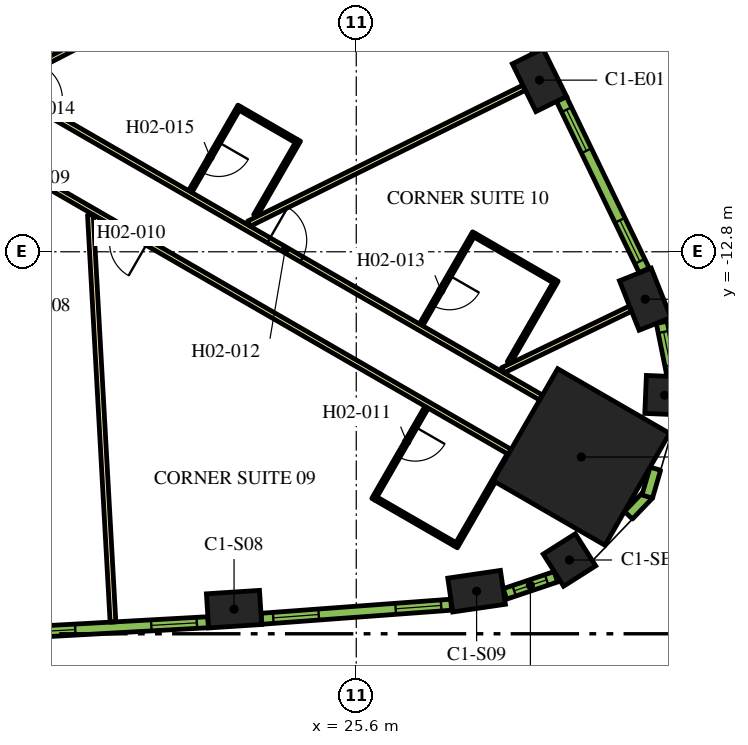
"""IFC4 building model, lengths in metres.
Left out: names, types, materials, properties, quantities, classifications, styles, units other than length and angle.
Written with IfcOpenShell. Run it as: python <this file> out.ifc"""

import sys

from ifc_helpers import new_model, si_unit, direction, frame, frame_2d, origin, origin_2d, place, context, subcontext, project, spatial, rectangle, extrude, element, fill, save


model = new_model("IFC4")
c1 = context("Model", 3, precision=1e-05, world=origin(), true_north=direction((0.0, 1.0)))
c2 = subcontext(c1, "Body", "Model", "MODEL_VIEW")
j1 = project(units=[si_unit("LENGTHUNIT", "METRE"), si_unit("PLANEANGLEUNIT", "RADIAN")], contexts=[c1])
p1 = place(None, origin())
s1 = spatial("IfcSite", under=j1, at=p1, CompositionType="ELEMENT")
p2 = place(p1, origin())
s2 = spatial("IfcBuilding", under=s1, at=p2, CompositionType="ELEMENT")
p3 = place(p2, frame((0.0, 0.0, 39.3)))
s3 = spatial("IfcBuildingStorey", under=s2, at=p3, CompositionType="ELEMENT", Elevation=39.3)
p4 = place(p3, frame((31.522, -18.199, 0.0), z_axis=(0.0, 0.0, 1.0), x_axis=(0.866025403784, -0.5, 0.0)))
e1 = element("IfcColumn", 1, at=p4, inside=s3, PredefinedType="COLUMN", context=c2, shape_type="SweptSolid", body=[
    extrude(rectangle(XDim=3.4, YDim=3.4, at=origin_2d()), origin(), (0.0, 0.0, 1.0), 3.9),
])
for number, where, z_axis, x_axis in (
    (2, (22.385, -22.204, 0.0), (0.0, 0.0, 1.0), (0.998, 0.065, 0.0)),
    (3, (28.767, -21.731, 0.0), (0.0, 0.0, 1.0), (0.989, 0.145, 0.0)),
):
    element("IfcColumn", number, at=place(p3, frame(where, z_axis=z_axis, x_axis=x_axis)), inside=s3, PredefinedType="COLUMN", context=c2, shape_type="SweptSolid", body=[
        extrude(rectangle(XDim=1.4, YDim=0.9, at=origin_2d()), origin(), (0.0, 0.0, 1.0), 3.9),
    ])
for number, where, z_axis, x_axis in (
    (4, (31.21, -20.91, 0.0), (0.0, 0.0, 1.0), (0.844, 0.536, 0.0)),
    (5, (33.713, -16.574, 0.0), (0.0, 0.0, 1.0), (0.042, 0.999, 0.0)),
):
    element("IfcColumn", number, at=place(p3, frame(where, z_axis=z_axis, x_axis=x_axis)), inside=s3, PredefinedType="COLUMN", context=c2, shape_type="SweptSolid", body=[
        extrude(rectangle(XDim=1.0, YDim=1.0, at=origin_2d()), origin(), (0.0, 0.0, 1.0), 3.9),
    ])
for number, where, z_axis, x_axis in (
    (6, (33.203, -14.047, 0.0), (0.0, 0.0, 1.0), (-0.369, 0.929, 0.0)),
    (7, (30.421, -8.284, 0.0), (0.0, 0.0, 1.0), (-0.443, 0.897, 0.0)),
):
    element("IfcColumn", number, at=place(p3, frame(where, z_axis=z_axis, x_axis=x_axis)), inside=s3, PredefinedType="COLUMN", context=c2, shape_type="SweptSolid", body=[
        extrude(rectangle(XDim=1.4, YDim=0.9, at=origin_2d()), origin(), (0.0, 0.0, 1.0), 3.9),
    ])
p5 = place(p3, frame((16.412, -8.523, 0.0), z_axis=(0.0, 0.0, 1.0), x_axis=(0.866022197818, -0.500005552856, 0.0)))
e8 = element("IfcWall", 8, at=p5, inside=s3, PredefinedType="PARTITIONING", context=c2, shape_type="SweptSolid", body=[
    extrude(rectangle(XDim=16.224, YDim=0.15, at=frame_2d((8.112, 0.0))), origin(), (0.0, 0.0, 1.0), 2.75),
])
p6 = place(p5, frame((7.949, 0.0, 0.0)))
e9 = element("IfcOpeningElement", 9, at=p6, cuts=e8, PredefinedType="OPENING", context=c2, shape_type="SweptSolid", body=[
    extrude(rectangle(XDim=1.0, YDim=2.1, at=frame_2d((0.5, 1.05))), frame((0.0, 0.085, 0.0), z_axis=(0.0, -1.0, 0.0), x_axis=(1.0, 0.0, 0.0)), (0.0, 0.0, 1.0), 0.17),
])
p7 = place(p5, frame((0.526, 0.0, 0.0)))
e10 = element("IfcOpeningElement", 10, at=p7, cuts=e8, PredefinedType="OPENING", context=c2, shape_type="SweptSolid", body=[
    extrude(rectangle(XDim=1.0, YDim=2.1, at=frame_2d((0.5, 1.05))), frame((0.0, 0.085, 0.0), z_axis=(0.0, -1.0, 0.0), x_axis=(1.0, 0.0, 0.0)), (0.0, 0.0, 1.0), 0.17),
])
p8 = place(p3, frame((19.081, -3.9, 0.0), z_axis=(0.0, 0.0, 1.0), x_axis=(-0.499974327079, -0.866040225545, 0.0)))
e11 = element("IfcWall", 11, at=p8, inside=s3, PredefinedType="PARTITIONING", context=c2, shape_type="SweptSolid", body=[
    extrude(rectangle(XDim=5.258, YDim=0.15, at=frame_2d((2.629, 0.0))), origin(), (0.0, 0.0, 1.0), 2.75),
])
p9 = place(p3, frame((29.638, -18.064, 0.0), z_axis=(0.0, 0.0, 1.0), x_axis=(-0.866026175601, 0.499998663172, 0.0)))
e12 = element("IfcWall", 12, at=p9, inside=s3, PredefinedType="PARTITIONING", context=c2, shape_type="SweptSolid", body=[
    extrude(rectangle(XDim=16.144, YDim=0.15, at=frame_2d((8.072, 0.0))), origin(), (0.0, 0.0, 1.0), 2.75),
])
p10 = place(p9, frame((13.948, 0.0, 0.0)))
e13 = element("IfcOpeningElement", 13, at=p10, cuts=e12, PredefinedType="OPENING", context=c2, shape_type="SweptSolid", body=[
    extrude(rectangle(XDim=0.9, YDim=2.1, at=frame_2d((0.45, 1.05))), frame((0.0, 0.085, 0.0), z_axis=(0.0, -1.0, 0.0), x_axis=(1.0, 0.0, 0.0)), (0.0, 0.0, 1.0), 0.17),
])
p11 = place(p9, frame((11.004, 0.0, 0.0)))
e14 = element("IfcOpeningElement", 14, at=p11, cuts=e12, PredefinedType="OPENING", context=c2, shape_type="SweptSolid", body=[
    extrude(rectangle(XDim=1.0, YDim=2.1, at=frame_2d((0.5, 1.05))), frame((0.0, 0.085, 0.0), z_axis=(0.0, -1.0, 0.0), x_axis=(1.0, 0.0, 0.0)), (0.0, 0.0, 1.0), 0.17),
])
p12 = place(p3, frame((27.134, -2.779, 0.0), z_axis=(0.0, 0.0, 1.0), x_axis=(-0.8882049501, -0.459447457951, 0.0)))
e15 = element("IfcWall", 15, at=p12, inside=s3, PredefinedType="PARTITIONING", context=c2, shape_type="SweptSolid", body=[
    extrude(rectangle(XDim=11.638, YDim=0.15, at=frame_2d((5.819, 0.0))), origin(), (0.0, 0.0, 1.0), 2.75),
])
p13 = place(p3, frame((19.198, -22.541, 0.0), z_axis=(0.0, 0.0, 1.0), x_axis=(-0.055432210572, 0.99846245299, 0.0)))
e16 = element("IfcWall", 16, at=p13, inside=s3, PredefinedType="PARTITIONING", context=c2, shape_type="SweptSolid", body=[
    extrude(rectangle(XDim=10.729, YDim=0.15, at=frame_2d((5.365, 0.0))), origin(), (0.0, 0.0, 1.0), 2.75),
])
p14 = place(p3, frame((30.018, -8.483, 0.0), z_axis=(0.0, 0.0, 1.0), x_axis=(-0.896544505264, -0.44295366584, 0.0)))
e17 = element("IfcWall", 17, at=p14, inside=s3, PredefinedType="PARTITIONING", context=c2, shape_type="SweptSolid", body=[
    extrude(rectangle(XDim=8.079, YDim=0.15, at=frame_2d((4.04, 0.0))), origin(), (0.0, 0.0, 1.0), 2.75),
])
p15 = place(p3, frame((32.817, -14.296, 0.0), z_axis=(0.0, 0.0, 1.0), x_axis=(-0.900616957918, -0.434613730927, 0.0)))
e18 = element("IfcWall", 18, at=p15, inside=s3, PredefinedType="PARTITIONING", context=c2, shape_type="SweptSolid", body=[
    extrude(rectangle(XDim=3.733, YDim=0.15, at=frame_2d((1.867, 0.0))), origin(), (0.0, 0.0, 1.0), 2.75),
])
p16 = place(p3, frame((27.452, -16.889, 0.0), z_axis=(0.0, 0.0, 1.0), x_axis=(-0.49998411664, -0.866034573852, 0.0)))
e19 = element("IfcWall", 19, at=p16, inside=s3, PredefinedType="PARTITIONING", context=c2, shape_type="SweptSolid", body=[
    extrude(rectangle(XDim=2.8, YDim=0.1, at=frame_2d((1.4, 0.0))), origin(), (0.0, 0.0, 1.0), 2.75),
])
p17 = place(p16, frame((0.6, 0.0, 0.0)))
e20 = element("IfcOpeningElement", 20, at=p17, cuts=e19, PredefinedType="OPENING", context=c2, shape_type="SweptSolid", body=[
    extrude(rectangle(XDim=0.9, YDim=2.1, at=frame_2d((0.45, 1.05))), frame((0.0, 0.06, 0.0), z_axis=(0.0, -1.0, 0.0), x_axis=(1.0, 0.0, 0.0)), (0.0, 0.0, 1.0), 0.12),
])
p18 = place(p3, frame((26.121, -19.295, 0.0), z_axis=(0.0, 0.0, 1.0), x_axis=(0.866006032174, -0.500033551112, 0.0)))
e21 = element("IfcWall", 21, at=p18, inside=s3, PredefinedType="PARTITIONING", context=c2, shape_type="SweptSolid", body=[
    extrude(rectangle(XDim=2.4, YDim=0.1, at=frame_2d((1.2, 0.0))), origin(), (0.0, 0.0, 1.0), 2.75),
])
p19 = place(p3, frame((29.617, -18.139, 0.0), z_axis=(0.0, 0.0, 1.0), x_axis=(-0.49998411664, -0.866034573852, 0.0)))
e22 = element("IfcWall", 22, at=p19, inside=s3, PredefinedType="PARTITIONING", context=c2, shape_type="SweptSolid", body=[
    extrude(rectangle(XDim=2.8, YDim=0.1, at=frame_2d((1.4, 0.0))), origin(), (0.0, 0.0, 1.0), 2.75),
])
p20 = place(p3, frame((28.704, -12.3, 0.0), z_axis=(0.0, 0.0, 1.0), x_axis=(-0.49998411664, -0.866034573852, 0.0)))
e23 = element("IfcWall", 23, at=p20, inside=s3, PredefinedType="PARTITIONING", context=c2, shape_type="SweptSolid", body=[
    extrude(rectangle(XDim=2.8, YDim=0.1, at=frame_2d((1.4, 0.0))), origin(), (0.0, 0.0, 1.0), 2.75),
])
p21 = place(p20, frame((1.3, 0.0, 0.0)))
e24 = element("IfcOpeningElement", 24, at=p21, cuts=e23, PredefinedType="OPENING", context=c2, shape_type="SweptSolid", body=[
    extrude(rectangle(XDim=0.9, YDim=2.1, at=frame_2d((0.45, 1.05))), frame((0.0, 0.06, 0.0), z_axis=(0.0, -1.0, 0.0), x_axis=(1.0, 0.0, 0.0)), (0.0, 0.0, 1.0), 0.12),
])
p22 = place(p3, frame((28.722, -12.368, 0.0), z_axis=(0.0, 0.0, 1.0), x_axis=(0.866050077142, -0.499957262057, 0.0)))
e25 = element("IfcWall", 25, at=p22, inside=s3, PredefinedType="PARTITIONING", context=c2, shape_type="SweptSolid", body=[
    extrude(rectangle(XDim=2.4, YDim=0.1, at=frame_2d((1.2, 0.0))), origin(), (0.0, 0.0, 1.0), 2.75),
])
p23 = place(p3, frame((29.619, -15.715, 0.0), z_axis=(0.0, 0.0, 1.0), x_axis=(0.500004234368, 0.866022959057, 0.0)))
e26 = element("IfcWall", 26, at=p23, inside=s3, PredefinedType="PARTITIONING", context=c2, shape_type="SweptSolid", body=[
    extrude(rectangle(XDim=2.5, YDim=0.1, at=frame_2d((1.25, 0.0))), origin(), (0.0, 0.0, 1.0), 2.75),
])
p24 = place(p3, frame((22.53, -8.966, 0.0), z_axis=(0.0, 0.0, 1.0), x_axis=(-0.500006934395, -0.866021400173, 0.0)))
e27 = element("IfcWall", 27, at=p24, inside=s3, PredefinedType="PARTITIONING", context=c2, shape_type="SweptSolid", body=[
    extrude(rectangle(XDim=2.6, YDim=0.1, at=frame_2d((1.3, 0.0))), origin(), (0.0, 0.0, 1.0), 2.75),
])
p25 = place(p24, frame((1.1, 0.0, 0.0)))
e28 = element("IfcOpeningElement", 28, at=p25, cuts=e27, PredefinedType="OPENING", context=c2, shape_type="SweptSolid", body=[
    extrude(rectangle(XDim=0.9, YDim=2.1, at=frame_2d((0.45, 1.05))), frame((0.0, 0.06, 0.0), z_axis=(0.0, -1.0, 0.0), x_axis=(1.0, 0.0, 0.0)), (0.0, 0.0, 1.0), 0.12),
])
p26 = place(p3, frame((22.549, -9.035, 0.0), z_axis=(0.0, 0.0, 1.0), x_axis=(0.86605165483, -0.499954529098, 0.0)))
e29 = element("IfcWall", 29, at=p26, inside=s3, PredefinedType="PARTITIONING", context=c2, shape_type="SweptSolid", body=[
    extrude(rectangle(XDim=1.7, YDim=0.1, at=frame_2d((0.85, 0.0))), origin(), (0.0, 0.0, 1.0), 2.75),
])
p27 = place(p3, frame((22.944, -11.85, 0.0), z_axis=(0.0, 0.0, 1.0), x_axis=(0.499968531483, 0.866043571379, 0.0)))
e30 = element("IfcWall", 30, at=p27, inside=s3, PredefinedType="PARTITIONING", context=c2, shape_type="SweptSolid", body=[
    extrude(rectangle(XDim=2.29, YDim=0.1, at=frame_2d((1.145, 0.0))), origin(), (0.0, 0.0, 1.0), 2.75),
])
p28 = place(p3, frame((16.711, -22.824, 0.0), z_axis=(0.0, 0.0, 1.0), x_axis=(0.998464708705, 0.055391564976, 0.0)))
e31 = element("IfcWall", 31, at=p28, inside=s3, PredefinedType="SOLIDWALL", context=c2, shape_type="SweptSolid", body=[
    extrude(rectangle(XDim=4.998, YDim=0.29, at=frame_2d((2.499, 0.0))), origin(), (0.0, 0.0, 1.0), 3.65),
])
p29 = place(p28, frame((0.297, 0.0, 0.9)))
e32 = element("IfcOpeningElement", 32, at=p29, cuts=e31, PredefinedType="OPENING", context=c2, shape_type="SweptSolid", body=[
    extrude(rectangle(XDim=1.2, YDim=2.15, at=frame_2d((0.6, 1.075))), frame((0.0, 0.155, 0.0), z_axis=(0.0, -1.0, 0.0), x_axis=(1.0, 0.0, 0.0)), (0.0, 0.0, 1.0), 0.31),
])
p30 = place(p28, frame((3.501, 0.0, 0.9)))
e33 = element("IfcOpeningElement", 33, at=p30, cuts=e31, PredefinedType="OPENING", context=c2, shape_type="SweptSolid", body=[
    extrude(rectangle(XDim=1.2, YDim=2.15, at=frame_2d((0.6, 1.075))), frame((0.0, 0.155, 0.0), z_axis=(0.0, -1.0, 0.0), x_axis=(1.0, 0.0, 0.0)), (0.0, 0.0, 1.0), 0.31),
])
p31 = place(p3, frame((23.106, -22.456, 0.0), z_axis=(0.0, 0.0, 1.0), x_axis=(0.997266290399, 0.073891447643, 0.0)))
e34 = element("IfcWall", 34, at=p31, inside=s3, PredefinedType="SOLIDWALL", context=c2, shape_type="SweptSolid", body=[
    extrude(rectangle(XDim=5.006, YDim=0.29, at=frame_2d((2.503, 0.0))), origin(), (0.0, 0.0, 1.0), 3.65),
])
p32 = place(p31, frame((0.31, 0.0, 0.9)))
e35 = element("IfcOpeningElement", 35, at=p32, cuts=e34, PredefinedType="OPENING", context=c2, shape_type="SweptSolid", body=[
    extrude(rectangle(XDim=1.2, YDim=2.15, at=frame_2d((0.6, 1.075))), frame((0.0, 0.155, 0.0), z_axis=(0.0, -1.0, 0.0), x_axis=(1.0, 0.0, 0.0)), (0.0, 0.0, 1.0), 0.31),
])
p33 = place(p31, frame((3.54, 0.0, 0.9)))
e36 = element("IfcOpeningElement", 36, at=p33, cuts=e34, PredefinedType="OPENING", context=c2, shape_type="SweptSolid", body=[
    extrude(rectangle(XDim=1.2, YDim=2.15, at=frame_2d((0.6, 1.075))), frame((0.0, 0.155, 0.0), z_axis=(0.0, -1.0, 0.0), x_axis=(1.0, 0.0, 0.0)), (0.0, 0.0, 1.0), 0.31),
])
p34 = place(p3, frame((29.512, -21.802, 0.0), z_axis=(0.0, 0.0, 1.0), x_axis=(0.947903891592, 0.318556450734, 0.0)))
e37 = element("IfcWall", 37, at=p34, inside=s3, PredefinedType="SOLIDWALL", context=c2, shape_type="SweptSolid", body=[
    extrude(rectangle(XDim=1.415, YDim=0.29, at=frame_2d((0.708, 0.0))), origin(), (0.0, 0.0, 1.0), 3.65),
])
p35 = place(p34, frame((0.257, 0.0, 0.9)))
e38 = element("IfcOpeningElement", 38, at=p35, cuts=e37, PredefinedType="OPENING", context=c2, shape_type="SweptSolid", body=[
    extrude(rectangle(XDim=0.9, YDim=2.15, at=frame_2d((0.45, 1.075))), frame((0.0, 0.155, 0.0), z_axis=(0.0, -1.0, 0.0), x_axis=(1.0, 0.0, 0.0)), (0.0, 0.0, 1.0), 0.31),
])
for number, where, z_axis, x_axis in (
    (39, (32.762, -19.732, 0.0), (0.0, 0.0, 1.0), (0.692, 0.722, 0.0)),
    (40, (33.257, -19.241, 0.0), (0.0, 0.0, 1.0), (0.279, 0.96, 0.0)),
):
    element("IfcWall", number, at=place(p3, frame(where, z_axis=z_axis, x_axis=x_axis)), inside=s3, PredefinedType="SOLIDWALL", context=c2, shape_type="SweptSolid", body=[
        extrude(rectangle(XDim=0.764, YDim=0.29, at=frame_2d((0.382, 0.0))), origin(), (0.0, 0.0, 1.0), 3.65),
    ])
p36 = place(p3, frame((33.917, -16.044, 0.0), z_axis=(0.0, 0.0, 1.0), x_axis=(-0.198106888228, 0.980180422594, 0.0)))
e41 = element("IfcWall", 41, at=p36, inside=s3, PredefinedType="SOLIDWALL", context=c2, shape_type="SweptSolid", body=[
    extrude(rectangle(XDim=1.415, YDim=0.29, at=frame_2d((0.708, 0.0))), origin(), (0.0, 0.0, 1.0), 3.65),
])
p37 = place(p36, frame((0.257, 0.0, 0.9)))
e42 = element("IfcOpeningElement", 42, at=p37, cuts=e41, PredefinedType="OPENING", context=c2, shape_type="SweptSolid", body=[
    extrude(rectangle(XDim=0.9, YDim=2.15, at=frame_2d((0.45, 1.075))), frame((0.0, 0.155, 0.0), z_axis=(0.0, -1.0, 0.0), x_axis=(1.0, 0.0, 0.0)), (0.0, 0.0, 1.0), 0.31),
])
p38 = place(p3, frame((33.176, -13.29, 0.0), z_axis=(0.0, 0.0, 1.0), x_axis=(-0.434664499056, 0.900592456808, 0.0)))
e43 = element("IfcWall", 43, at=p38, inside=s3, PredefinedType="SOLIDWALL", context=c2, shape_type="SweptSolid", body=[
    extrude(rectangle(XDim=5.006, YDim=0.29, at=frame_2d((2.503, 0.0))), origin(), (0.0, 0.0, 1.0), 3.65),
])
p39 = place(p38, frame((0.265, 0.0, 0.9)))
e44 = element("IfcOpeningElement", 44, at=p39, cuts=e43, PredefinedType="OPENING", context=c2, shape_type="SweptSolid", body=[
    extrude(rectangle(XDim=1.2, YDim=2.15, at=frame_2d((0.6, 1.075))), frame((0.0, 0.155, 0.0), z_axis=(0.0, -1.0, 0.0), x_axis=(1.0, 0.0, 0.0)), (0.0, 0.0, 1.0), 0.31),
])
p40 = place(p38, frame((3.496, 0.0, 0.9)))
e45 = element("IfcOpeningElement", 45, at=p40, cuts=e43, PredefinedType="OPENING", context=c2, shape_type="SweptSolid", body=[
    extrude(rectangle(XDim=1.2, YDim=2.15, at=frame_2d((0.6, 1.075))), frame((0.0, 0.155, 0.0), z_axis=(0.0, -1.0, 0.0), x_axis=(1.0, 0.0, 0.0)), (0.0, 0.0, 1.0), 0.31),
])
p41 = place(p3, frame((30.377, -7.521, 0.0), z_axis=(0.0, 0.0, 1.0), x_axis=(-0.451233929645, 0.892405704115, 0.0)))
e46 = element("IfcWall", 46, at=p41, inside=s3, PredefinedType="SOLIDWALL", context=c2, shape_type="SweptSolid", body=[
    extrude(rectangle(XDim=4.998, YDim=0.29, at=frame_2d((2.499, 0.0))), origin(), (0.0, 0.0, 1.0), 3.65),
])
p42 = place(p41, frame((0.297, 0.0, 0.9)))
e47 = element("IfcOpeningElement", 47, at=p42, cuts=e46, PredefinedType="OPENING", context=c2, shape_type="SweptSolid", body=[
    extrude(rectangle(XDim=1.2, YDim=2.15, at=frame_2d((0.6, 1.075))), frame((0.0, 0.155, 0.0), z_axis=(0.0, -1.0, 0.0), x_axis=(1.0, 0.0, 0.0)), (0.0, 0.0, 1.0), 0.31),
])
p43 = place(p41, frame((3.501, 0.0, 0.9)))
e48 = element("IfcOpeningElement", 48, at=p43, cuts=e46, PredefinedType="OPENING", context=c2, shape_type="SweptSolid", body=[
    extrude(rectangle(XDim=1.2, YDim=2.15, at=frame_2d((0.6, 1.075))), frame((0.0, 0.155, 0.0), z_axis=(0.0, -1.0, 0.0), x_axis=(1.0, 0.0, 0.0)), (0.0, 0.0, 1.0), 0.31),
])
p44 = place(p11, origin())
e49 = element("IfcDoor", 49, at=p44, inside=s3, OperationType="SINGLE_SWING_RIGHT", PredefinedType="DOOR", context=c2, shape_type="SweptSolid", body=[
    extrude(rectangle(XDim=1.0, YDim=2.1, at=frame_2d((0.5, 1.05))), frame((0.0, 0.025, 0.0), z_axis=(0.0, -1.0, 0.0), x_axis=(1.0, 0.0, 0.0)), (0.0, 0.0, 1.0), 0.05),
])
fill(e14, e49)
p45 = place(p17, origin())
e50 = element("IfcDoor", 50, at=p45, inside=s3, OperationType="SINGLE_SWING_RIGHT", PredefinedType="DOOR", context=c2, shape_type="SweptSolid", body=[
    extrude(rectangle(XDim=0.9, YDim=2.1, at=frame_2d((0.45, 1.05))), frame((0.0, 0.025, 0.0), z_axis=(0.0, -1.0, 0.0), x_axis=(1.0, 0.0, 0.0)), (0.0, 0.0, 1.0), 0.05),
])
fill(e20, e50)
p46 = place(p6, origin())
e51 = element("IfcDoor", 51, at=p46, inside=s3, OperationType="SINGLE_SWING_LEFT", PredefinedType="DOOR", context=c2, shape_type="SweptSolid", body=[
    extrude(rectangle(XDim=1.0, YDim=2.1, at=frame_2d((0.5, 1.05))), frame((0.0, 0.025, 0.0), z_axis=(0.0, -1.0, 0.0), x_axis=(1.0, 0.0, 0.0)), (0.0, 0.0, 1.0), 0.05),
])
fill(e9, e51)
p47 = place(p21, origin())
e52 = element("IfcDoor", 52, at=p47, inside=s3, OperationType="SINGLE_SWING_LEFT", PredefinedType="DOOR", context=c2, shape_type="SweptSolid", body=[
    extrude(rectangle(XDim=0.9, YDim=2.1, at=frame_2d((0.45, 1.05))), frame((0.0, 0.025, 0.0), z_axis=(0.0, -1.0, 0.0), x_axis=(1.0, 0.0, 0.0)), (0.0, 0.0, 1.0), 0.05),
])
fill(e24, e52)
p48 = place(p7, origin())
e53 = element("IfcDoor", 53, at=p48, inside=s3, OperationType="SINGLE_SWING_LEFT", PredefinedType="DOOR", context=c2, shape_type="SweptSolid", body=[
    extrude(rectangle(XDim=1.0, YDim=2.1, at=frame_2d((0.5, 1.05))), frame((0.0, 0.025, 0.0), z_axis=(0.0, -1.0, 0.0), x_axis=(1.0, 0.0, 0.0)), (0.0, 0.0, 1.0), 0.05),
])
fill(e10, e53)
p49 = place(p25, origin())
e54 = element("IfcDoor", 54, at=p49, inside=s3, OperationType="SINGLE_SWING_LEFT", PredefinedType="DOOR", context=c2, shape_type="SweptSolid", body=[
    extrude(rectangle(XDim=0.9, YDim=2.1, at=frame_2d((0.45, 1.05))), frame((0.0, 0.025, 0.0), z_axis=(0.0, -1.0, 0.0), x_axis=(1.0, 0.0, 0.0)), (0.0, 0.0, 1.0), 0.05),
])
fill(e28, e54)
p50 = place(p29, origin())
e55 = element("IfcWindow", 55, at=p50, inside=s3, PartitioningType="DOUBLE_PANEL_VERTICAL", PredefinedType="WINDOW", context=c2, shape_type="SweptSolid", body=[
    extrude(rectangle(XDim=1.2, YDim=2.15, at=frame_2d((0.6, 1.075))), frame((0.0, 0.015, 0.0), z_axis=(0.0, -1.0, 0.0), x_axis=(1.0, 0.0, 0.0)), (0.0, 0.0, 1.0), 0.06),
])
fill(e32, e55)
p51 = place(p30, origin())
e56 = element("IfcWindow", 56, at=p51, inside=s3, PartitioningType="DOUBLE_PANEL_VERTICAL", PredefinedType="WINDOW", context=c2, shape_type="SweptSolid", body=[
    extrude(rectangle(XDim=1.2, YDim=2.15, at=frame_2d((0.6, 1.075))), frame((0.0, 0.015, 0.0), z_axis=(0.0, -1.0, 0.0), x_axis=(1.0, 0.0, 0.0)), (0.0, 0.0, 1.0), 0.06),
])
fill(e33, e56)
p52 = place(p32, origin())
e57 = element("IfcWindow", 57, at=p52, inside=s3, PartitioningType="DOUBLE_PANEL_VERTICAL", PredefinedType="WINDOW", context=c2, shape_type="SweptSolid", body=[
    extrude(rectangle(XDim=1.2, YDim=2.15, at=frame_2d((0.6, 1.075))), frame((0.0, 0.015, 0.0), z_axis=(0.0, -1.0, 0.0), x_axis=(1.0, 0.0, 0.0)), (0.0, 0.0, 1.0), 0.06),
])
fill(e35, e57)
p53 = place(p33, origin())
e58 = element("IfcWindow", 58, at=p53, inside=s3, PartitioningType="DOUBLE_PANEL_VERTICAL", PredefinedType="WINDOW", context=c2, shape_type="SweptSolid", body=[
    extrude(rectangle(XDim=1.2, YDim=2.15, at=frame_2d((0.6, 1.075))), frame((0.0, 0.015, 0.0), z_axis=(0.0, -1.0, 0.0), x_axis=(1.0, 0.0, 0.0)), (0.0, 0.0, 1.0), 0.06),
])
fill(e36, e58)
p54 = place(p35, origin())
e59 = element("IfcWindow", 59, at=p54, inside=s3, PartitioningType="SINGLE_PANEL", PredefinedType="WINDOW", context=c2, shape_type="SweptSolid", body=[
    extrude(rectangle(XDim=0.9, YDim=2.15, at=frame_2d((0.45, 1.075))), frame((0.0, 0.015, 0.0), z_axis=(0.0, -1.0, 0.0), x_axis=(1.0, 0.0, 0.0)), (0.0, 0.0, 1.0), 0.06),
])
fill(e38, e59)
p55 = place(p37, origin())
e60 = element("IfcWindow", 60, at=p55, inside=s3, PartitioningType="SINGLE_PANEL", PredefinedType="WINDOW", context=c2, shape_type="SweptSolid", body=[
    extrude(rectangle(XDim=0.9, YDim=2.15, at=frame_2d((0.45, 1.075))), frame((0.0, 0.015, 0.0), z_axis=(0.0, -1.0, 0.0), x_axis=(1.0, 0.0, 0.0)), (0.0, 0.0, 1.0), 0.06),
])
fill(e42, e60)
p56 = place(p39, origin())
e61 = element("IfcWindow", 61, at=p56, inside=s3, PartitioningType="DOUBLE_PANEL_VERTICAL", PredefinedType="WINDOW", context=c2, shape_type="SweptSolid", body=[
    extrude(rectangle(XDim=1.2, YDim=2.15, at=frame_2d((0.6, 1.075))), frame((0.0, 0.015, 0.0), z_axis=(0.0, -1.0, 0.0), x_axis=(1.0, 0.0, 0.0)), (0.0, 0.0, 1.0), 0.06),
])
fill(e44, e61)
p57 = place(p40, origin())
e62 = element("IfcWindow", 62, at=p57, inside=s3, PartitioningType="DOUBLE_PANEL_VERTICAL", PredefinedType="WINDOW", context=c2, shape_type="SweptSolid", body=[
    extrude(rectangle(XDim=1.2, YDim=2.15, at=frame_2d((0.6, 1.075))), frame((0.0, 0.015, 0.0), z_axis=(0.0, -1.0, 0.0), x_axis=(1.0, 0.0, 0.0)), (0.0, 0.0, 1.0), 0.06),
])
fill(e45, e62)
save(model, sys.argv[1])
